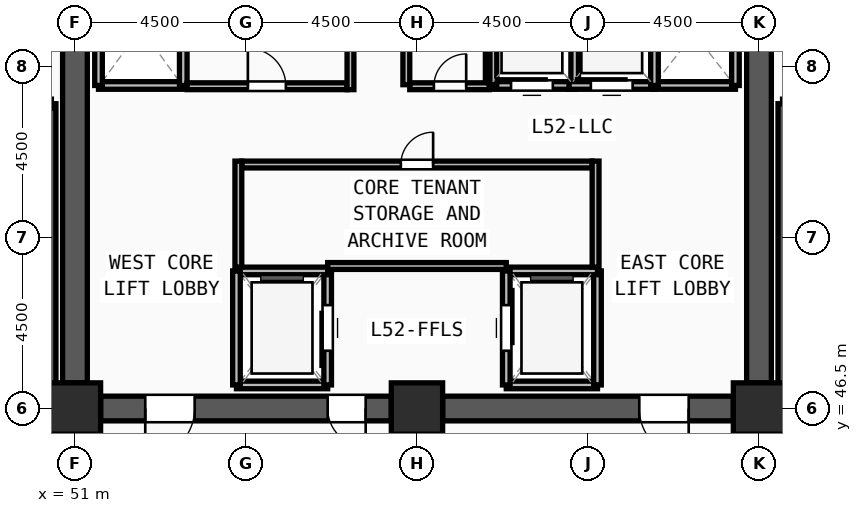
"""IFC4 building model, lengths in metres.
Left out: names, types, materials, properties, quantities, classifications, styles, units other than length and angle.
Written with IfcOpenShell. Run it as: python <this file> out.ifc"""

import sys

from ifc_helpers import new_model, si_unit, direction, frame, frame_2d, origin, origin_2d, place, context, subcontext, project, spatial, rectangle, extrude, source, transform, mapped, element, fill, save


model = new_model("IFC4")
c1 = context("Model", 3, precision=1e-05, world=origin(), true_north=direction((0.0, 1.0)))
c2 = subcontext(c1, "Body", "Model", "MODEL_VIEW")
j1 = project(units=[si_unit("LENGTHUNIT", "METRE"), si_unit("PLANEANGLEUNIT", "RADIAN")], contexts=[c1])
p1 = place(None, origin())
s1 = spatial("IfcSite", under=j1, at=p1, CompositionType="ELEMENT")
p2 = place(p1, origin())
s2 = spatial("IfcBuilding", under=s1, at=p2, CompositionType="ELEMENT")
p3 = place(p2, frame((0.0, 0.0, 201.75)))
s3 = spatial("IfcBuildingStorey", under=s2, at=p3, CompositionType="ELEMENT", Elevation=201.75)
m1 = source(origin(), c2, "Body", "SweptSolid", [
    extrude(rectangle(XDim=1.35, YDim=1.35, at=origin_2d()), origin(), (0.0, 0.0, 1.0), 3.75),
])
for number, where, z_axis, x_axis in (
    (1, (51.0, 46.5, 0.0), (0.0, 0.0, 1.0), (1.0, 0.0, 0.0)),
    (2, (60.0, 46.5, 0.0), (0.0, 0.0, 1.0), (1.0, 0.0, 0.0)),
    (3, (69.0, 46.5, 0.0), (0.0, 0.0, 1.0), (1.0, 0.0, 0.0)),
):
    element("IfcColumn", number, at=place(p3, frame(where, z_axis=z_axis, x_axis=x_axis)), inside=s3, PredefinedType="COLUMN", context=c2, shape_type="MappedRepresentation", body=[
        mapped(m1, transform((0.0, 0.0, 0.0), x_axis=(1.0, 0.0, 0.0), y_axis=(0.0, 1.0, 0.0), z_axis=(0.0, 0.0, 1.0), scale=1.0)),
    ])
p4 = place(p3, frame((69.0, 60.825, 0.0), z_axis=(0.0, 0.0, 1.0), x_axis=(0.0, -1.0, 0.0)))
e4 = element("IfcWall", 4, at=p4, inside=s3, PredefinedType="SHEAR", context=c2, shape_type="SweptSolid", body=[
    extrude(rectangle(XDim=13.65, YDim=0.65, at=frame_2d((6.825, 0.0))), origin(), (0.0, 0.0, 1.0), 3.57),
])
m2 = source(origin(), c2, "Body", "SweptSolid", [
    extrude(rectangle(XDim=1.2, YDim=2.2, at=frame_2d((0.6, 1.1))), frame((0.0, 0.335, 0.0), z_axis=(0.0, -1.0, 0.0), x_axis=(1.0, 0.0, 0.0)), (0.0, 0.0, 1.0), 0.67),
])
p5 = place(p4, frame((1.275, 0.0, 0.0)))
e5 = element("IfcOpeningElement", 5, at=p5, cuts=e4, PredefinedType="OPENING", context=c2, shape_type="MappedRepresentation", body=[
    mapped(m2, transform((0.0, 0.0, 0.0), x_axis=(1.0, 0.0, 0.0), y_axis=(0.0, 1.0, 0.0), z_axis=(0.0, 0.0, 1.0), scale=1.0)),
])
p6 = place(p3, frame((68.325, 46.5, 0.0), z_axis=(0.0, 0.0, 1.0), x_axis=(-1.0, 0.0, 0.0)))
e6 = element("IfcWall", 6, at=p6, inside=s3, PredefinedType="SHEAR", context=c2, shape_type="SweptSolid", body=[
    extrude(rectangle(XDim=7.65, YDim=0.65, at=frame_2d((3.825, 0.0))), origin(), (0.0, 0.0, 1.0), 3.57),
])
m3 = source(origin(), c2, "Body", "SweptSolid", [
    extrude(rectangle(XDim=1.3, YDim=2.2, at=frame_2d((0.65, 1.1))), frame((0.0, 0.335, 0.0), z_axis=(0.0, -1.0, 0.0), x_axis=(1.0, 0.0, 0.0)), (0.0, 0.0, 1.0), 0.67),
])
p7 = place(p6, frame((1.175, 0.0, 0.0)))
e7 = element("IfcOpeningElement", 7, at=p7, cuts=e6, PredefinedType="OPENING", context=c2, shape_type="MappedRepresentation", body=[
    mapped(m3, transform((0.0, 0.0, 0.0), x_axis=(1.0, 0.0, 0.0), y_axis=(0.0, 1.0, 0.0), z_axis=(0.0, 0.0, 1.0), scale=1.0)),
])
p8 = place(p3, frame((59.325, 46.5, 0.0), z_axis=(0.0, 0.0, 1.0), x_axis=(-1.0, 0.0, 0.0)))
e8 = element("IfcWall", 8, at=p8, inside=s3, PredefinedType="SHEAR", context=c2, shape_type="SweptSolid", body=[
    extrude(rectangle(XDim=7.65, YDim=0.65, at=frame_2d((3.825, 0.0))), origin(), (0.0, 0.0, 1.0), 3.57),
])
p9 = place(p8, frame((5.175, 0.0, 0.0)))
e9 = element("IfcOpeningElement", 9, at=p9, cuts=e8, PredefinedType="OPENING", context=c2, shape_type="MappedRepresentation", body=[
    mapped(m3, transform((0.0, 0.0, 0.0), x_axis=(1.0, 0.0, 0.0), y_axis=(0.0, 1.0, 0.0), z_axis=(0.0, 0.0, 1.0), scale=1.0)),
])
m4 = source(origin(), c2, "Body", "SweptSolid", [
    extrude(rectangle(XDim=1.0, YDim=2.2, at=frame_2d((0.5, 1.1))), frame((0.0, 0.335, 0.0), z_axis=(0.0, -1.0, 0.0), x_axis=(1.0, 0.0, 0.0)), (0.0, 0.0, 1.0), 0.67),
])
p10 = place(p8, frame((0.675, 0.0, 0.0)))
e10 = element("IfcOpeningElement", 10, at=p10, cuts=e8, PredefinedType="OPENING", context=c2, shape_type="MappedRepresentation", body=[
    mapped(m4, transform((0.0, 0.0, 0.0), x_axis=(1.0, 0.0, 0.0), y_axis=(0.0, 1.0, 0.0), z_axis=(0.0, 0.0, 1.0), scale=1.0)),
])
p11 = place(p3, frame((51.0, 47.175, 0.0), z_axis=(0.0, 0.0, 1.0), x_axis=(0.0, 1.0, 0.0)))
e11 = element("IfcWall", 11, at=p11, inside=s3, PredefinedType="SHEAR", context=c2, shape_type="SweptSolid", body=[
    extrude(rectangle(XDim=13.65, YDim=0.65, at=frame_2d((6.825, 0.0))), origin(), (0.0, 0.0, 1.0), 3.57),
])
for number, where, z_axis, x_axis in (
    (12, (50.38, 46.7, 0.0), (0.0, 0.0, 1.0), (0.0, 1.0, 0.0)),
    (13, (69.62, 54.52, 0.0), (0.0, 0.0, 1.0), (0.0, -1.0, 0.0)),
):
    element("IfcWall", number, at=place(p3, frame(where, z_axis=z_axis, x_axis=x_axis)), inside=s3, PredefinedType="SOLIDWALL", context=c2, shape_type="SweptSolid", body=[
        extrude(rectangle(XDim=7.82, YDim=0.24, at=frame_2d((3.91, 0.0))), origin(), (0.0, 0.0, 1.0), 3.57),
    ])
p12 = place(p3, frame((55.25, 47.12, 0.0), z_axis=(0.0, 0.0, 1.0), x_axis=(1.0, 0.0, 0.0)))
e14 = element("IfcWall", 14, at=p12, inside=s3, PredefinedType="SOLIDWALL", context=c2, shape_type="SweptSolid", body=[
    extrude(rectangle(XDim=2.4, YDim=0.2, at=frame_2d((1.2, 0.0))), origin(), (0.0, 0.0, 1.0), 3.57),
])
p13 = place(p3, frame((57.65, 47.12, 0.0), z_axis=(0.0, 0.0, 1.0), x_axis=(0.0, 1.0, 0.0)))
e15 = element("IfcWall", 15, at=p13, inside=s3, PredefinedType="SOLIDWALL", context=c2, shape_type="SweptSolid", body=[
    extrude(rectangle(XDim=3.0, YDim=0.2, at=frame_2d((1.5, 0.0))), origin(), (0.0, 0.0, 1.0), 3.57),
])
m5 = source(origin(), c2, "Body", "SweptSolid", [
    extrude(rectangle(XDim=1.2, YDim=2.3, at=frame_2d((0.6, 1.15))), frame((0.0, 0.11, 0.0), z_axis=(0.0, -1.0, 0.0), x_axis=(1.0, 0.0, 0.0)), (0.0, 0.0, 1.0), 0.22),
])
p14 = place(p13, frame((0.9, 0.0, 0.0)))
e16 = element("IfcOpeningElement", 16, at=p14, cuts=e15, PredefinedType="OPENING", context=c2, shape_type="MappedRepresentation", body=[
    mapped(m5, transform((0.0, 0.0, 0.0), x_axis=(1.0, 0.0, 0.0), y_axis=(0.0, 1.0, 0.0), z_axis=(0.0, 0.0, 1.0), scale=1.0)),
])
p15 = place(p3, frame((57.65, 50.12, 0.0), z_axis=(0.0, 0.0, 1.0), x_axis=(-1.0, 0.0, 0.0)))
e17 = element("IfcWall", 17, at=p15, inside=s3, PredefinedType="SOLIDWALL", context=c2, shape_type="SweptSolid", body=[
    extrude(rectangle(XDim=2.4, YDim=0.2, at=frame_2d((1.2, 0.0))), origin(), (0.0, 0.0, 1.0), 3.57),
])
p16 = place(p3, frame((55.25, 50.12, 0.0), z_axis=(0.0, 0.0, 1.0), x_axis=(0.0, -1.0, 0.0)))
e18 = element("IfcWall", 18, at=p16, inside=s3, PredefinedType="SOLIDWALL", context=c2, shape_type="SweptSolid", body=[
    extrude(rectangle(XDim=3.0, YDim=0.2, at=frame_2d((1.5, 0.0))), origin(), (0.0, 0.0, 1.0), 3.57),
])
p17 = place(p3, frame((62.35, 47.12, 0.0), z_axis=(0.0, 0.0, 1.0), x_axis=(1.0, 0.0, 0.0)))
e19 = element("IfcWall", 19, at=p17, inside=s3, PredefinedType="SOLIDWALL", context=c2, shape_type="SweptSolid", body=[
    extrude(rectangle(XDim=2.4, YDim=0.2, at=frame_2d((1.2, 0.0))), origin(), (0.0, 0.0, 1.0), 3.57),
])
p18 = place(p3, frame((64.75, 47.12, 0.0), z_axis=(0.0, 0.0, 1.0), x_axis=(0.0, 1.0, 0.0)))
e20 = element("IfcWall", 20, at=p18, inside=s3, PredefinedType="SOLIDWALL", context=c2, shape_type="SweptSolid", body=[
    extrude(rectangle(XDim=3.0, YDim=0.2, at=frame_2d((1.5, 0.0))), origin(), (0.0, 0.0, 1.0), 3.57),
])
p19 = place(p3, frame((64.75, 50.12, 0.0), z_axis=(0.0, 0.0, 1.0), x_axis=(-1.0, 0.0, 0.0)))
e21 = element("IfcWall", 21, at=p19, inside=s3, PredefinedType="SOLIDWALL", context=c2, shape_type="SweptSolid", body=[
    extrude(rectangle(XDim=2.4, YDim=0.2, at=frame_2d((1.2, 0.0))), origin(), (0.0, 0.0, 1.0), 3.57),
])
p20 = place(p3, frame((62.35, 50.12, 0.0), z_axis=(0.0, 0.0, 1.0), x_axis=(0.0, -1.0, 0.0)))
e22 = element("IfcWall", 22, at=p20, inside=s3, PredefinedType="SOLIDWALL", context=c2, shape_type="SweptSolid", body=[
    extrude(rectangle(XDim=3.0, YDim=0.2, at=frame_2d((1.5, 0.0))), origin(), (0.0, 0.0, 1.0), 3.57),
])
p21 = place(p20, frame((0.9, 0.0, 0.0)))
e23 = element("IfcOpeningElement", 23, at=p21, cuts=e22, PredefinedType="OPENING", context=c2, shape_type="MappedRepresentation", body=[
    mapped(m5, transform((0.0, 0.0, 0.0), x_axis=(1.0, 0.0, 0.0), y_axis=(0.0, 1.0, 0.0), z_axis=(0.0, 0.0, 1.0), scale=1.0)),
])
p22 = place(p3, frame((51.62, 55.0, 0.0), z_axis=(0.0, 0.0, 1.0), x_axis=(1.0, 0.0, 0.0)))
e24 = element("IfcWall", 24, at=p22, inside=s3, PredefinedType="SOLIDWALL", context=c2, shape_type="SweptSolid", body=[
    extrude(rectangle(XDim=2.23, YDim=0.2, at=frame_2d((1.115, 0.0))), origin(), (0.0, 0.0, 1.0), 3.57),
])
for number, where, z_axis, x_axis in (
    (25, (53.85, 55.0, 0.0), (0.0, 0.0, 1.0), (0.0, 1.0, 0.0)),
    (26, (51.62, 58.0, 0.0), (0.0, 0.0, 1.0), (0.0, -1.0, 0.0)),
):
    element("IfcWall", number, at=place(p3, frame(where, z_axis=z_axis, x_axis=x_axis)), inside=s3, PredefinedType="SOLIDWALL", context=c2, shape_type="SweptSolid", body=[
        extrude(rectangle(XDim=3.0, YDim=0.2, at=frame_2d((1.5, 0.0))), origin(), (0.0, 0.0, 1.0), 3.57),
    ])
p23 = place(p3, frame((66.2, 55.0, 0.0), z_axis=(0.0, 0.0, 1.0), x_axis=(1.0, 0.0, 0.0)))
e27 = element("IfcWall", 27, at=p23, inside=s3, PredefinedType="SOLIDWALL", context=c2, shape_type="SweptSolid", body=[
    extrude(rectangle(XDim=2.18, YDim=0.2, at=frame_2d((1.09, 0.0))), origin(), (0.0, 0.0, 1.0), 3.57),
])
p24 = place(p3, frame((68.38, 55.0, 0.0), z_axis=(0.0, 0.0, 1.0), x_axis=(0.0, 1.0, 0.0)))
e28 = element("IfcWall", 28, at=p24, inside=s3, PredefinedType="SOLIDWALL", context=c2, shape_type="SweptSolid", body=[
    extrude(rectangle(XDim=2.75, YDim=0.2, at=frame_2d((1.375, 0.0))), origin(), (0.0, 0.0, 1.0), 3.57),
])
p25 = place(p3, frame((61.9, 55.0, 0.0), z_axis=(0.0, 0.0, 1.0), x_axis=(1.0, 0.0, 0.0)))
e29 = element("IfcWall", 29, at=p25, inside=s3, PredefinedType="SOLIDWALL", context=c2, shape_type="SweptSolid", body=[
    extrude(rectangle(XDim=2.25, YDim=0.2, at=frame_2d((1.125, 0.0))), origin(), (0.0, 0.0, 1.0), 3.57),
])
m6 = source(origin(), c2, "Body", "SweptSolid", [
    extrude(rectangle(XDim=1.1, YDim=2.2, at=frame_2d((0.55, 1.1))), frame((0.0, 0.11, 0.0), z_axis=(0.0, -1.0, 0.0), x_axis=(1.0, 0.0, 0.0)), (0.0, 0.0, 1.0), 0.22),
])
p26 = place(p25, frame((0.575, 0.0, 0.0)))
e30 = element("IfcOpeningElement", 30, at=p26, cuts=e29, PredefinedType="OPENING", context=c2, shape_type="MappedRepresentation", body=[
    mapped(m6, transform((0.0, 0.0, 0.0), x_axis=(1.0, 0.0, 0.0), y_axis=(0.0, 1.0, 0.0), z_axis=(0.0, 0.0, 1.0), scale=1.0)),
])
for number, where, z_axis, x_axis in (
    (31, (64.15, 55.0, 0.0), (0.0, 0.0, 1.0), (0.0, 1.0, 0.0)),
    (32, (61.9, 57.6, 0.0), (0.0, 0.0, 1.0), (0.0, -1.0, 0.0)),
):
    element("IfcWall", number, at=place(p3, frame(where, z_axis=z_axis, x_axis=x_axis)), inside=s3, PredefinedType="SOLIDWALL", context=c2, shape_type="SweptSolid", body=[
        extrude(rectangle(XDim=2.6, YDim=0.2, at=frame_2d((1.3, 0.0))), origin(), (0.0, 0.0, 1.0), 3.57),
    ])
p27 = place(p3, frame((64.0, 55.0, 0.0), z_axis=(0.0, 0.0, 1.0), x_axis=(1.0, 0.0, 0.0)))
e33 = element("IfcWall", 33, at=p27, inside=s3, PredefinedType="SOLIDWALL", context=c2, shape_type="SweptSolid", body=[
    extrude(rectangle(XDim=2.25, YDim=0.2, at=frame_2d((1.125, 0.0))), origin(), (0.0, 0.0, 1.0), 3.57),
])
p28 = place(p27, frame((0.575, 0.0, 0.0)))
e34 = element("IfcOpeningElement", 34, at=p28, cuts=e33, PredefinedType="OPENING", context=c2, shape_type="MappedRepresentation", body=[
    mapped(m6, transform((0.0, 0.0, 0.0), x_axis=(1.0, 0.0, 0.0), y_axis=(0.0, 1.0, 0.0), z_axis=(0.0, 0.0, 1.0), scale=1.0)),
])
p29 = place(p3, frame((66.25, 55.0, 0.0), z_axis=(0.0, 0.0, 1.0), x_axis=(0.0, 1.0, 0.0)))
e35 = element("IfcWall", 35, at=p29, inside=s3, PredefinedType="SOLIDWALL", context=c2, shape_type="SweptSolid", body=[
    extrude(rectangle(XDim=2.6, YDim=0.2, at=frame_2d((1.3, 0.0))), origin(), (0.0, 0.0, 1.0), 3.57),
])
p30 = place(p3, frame((55.39, 52.92, 0.0), z_axis=(0.0, 0.0, 1.0), x_axis=(1.0, 0.0, 0.0)))
e36 = element("IfcWall", 36, at=p30, inside=s3, PredefinedType="PARTITIONING", context=c2, shape_type="SweptSolid", body=[
    extrude(rectangle(XDim=9.22, YDim=0.18, at=frame_2d((4.61, 0.0))), origin(), (0.0, 0.0, 1.0), 3.57),
])
m7 = source(origin(), c2, "Body", "SweptSolid", [
    extrude(rectangle(XDim=0.85, YDim=2.1, at=frame_2d((0.425, 1.05))), frame((0.0, 0.1, 0.0), z_axis=(0.0, -1.0, 0.0), x_axis=(1.0, 0.0, 0.0)), (0.0, 0.0, 1.0), 0.2),
])
p31 = place(p30, frame((4.185, 0.0, 0.0)))
e37 = element("IfcOpeningElement", 37, at=p31, cuts=e36, PredefinedType="OPENING", context=c2, shape_type="MappedRepresentation", body=[
    mapped(m7, transform((0.0, 0.0, 0.0), x_axis=(1.0, 0.0, 0.0), y_axis=(0.0, 1.0, 0.0), z_axis=(0.0, 0.0, 1.0), scale=1.0)),
])
p32 = place(p3, frame((53.95, 54.98, 0.0), z_axis=(0.0, 0.0, 1.0), x_axis=(1.0, 0.0, 0.0)))
e38 = element("IfcWall", 38, at=p32, inside=s3, PredefinedType="PARTITIONING", context=c2, shape_type="SweptSolid", body=[
    extrude(rectangle(XDim=4.21, YDim=0.18, at=frame_2d((2.105, 0.0))), origin(), (0.0, 0.0, 1.0), 3.57),
])
m8 = source(origin(), c2, "Body", "SweptSolid", [
    extrude(rectangle(XDim=1.0, YDim=2.2, at=frame_2d((0.5, 1.1))), frame((0.0, 0.1, 0.0), z_axis=(0.0, -1.0, 0.0), x_axis=(1.0, 0.0, 0.0)), (0.0, 0.0, 1.0), 0.2),
])
p33 = place(p32, frame((1.6, 0.0, 0.0)))
e39 = element("IfcOpeningElement", 39, at=p33, cuts=e38, PredefinedType="OPENING", context=c2, shape_type="MappedRepresentation", body=[
    mapped(m8, transform((0.0, 0.0, 0.0), x_axis=(1.0, 0.0, 0.0), y_axis=(0.0, 1.0, 0.0), z_axis=(0.0, 0.0, 1.0), scale=1.0)),
])
p34 = place(p3, frame((59.81, 54.98, 0.0), z_axis=(0.0, 0.0, 1.0), x_axis=(1.0, 0.0, 0.0)))
e40 = element("IfcWall", 40, at=p34, inside=s3, PredefinedType="PARTITIONING", context=c2, shape_type="SweptSolid", body=[
    extrude(rectangle(XDim=2.09, YDim=0.18, at=frame_2d((1.045, 0.0))), origin(), (0.0, 0.0, 1.0), 3.57),
])
p35 = place(p34, frame((0.635, 0.0, 0.0)))
e41 = element("IfcOpeningElement", 41, at=p35, cuts=e40, PredefinedType="OPENING", context=c2, shape_type="MappedRepresentation", body=[
    mapped(m7, transform((0.0, 0.0, 0.0), x_axis=(1.0, 0.0, 0.0), y_axis=(0.0, 1.0, 0.0), z_axis=(0.0, 0.0, 1.0), scale=1.0)),
])
for number, where, z_axis, x_axis in (
    (42, (59.72, 55.02, 0.0), (0.0, 0.0, 1.0), (0.0, 1.0, 0.0)),
    (43, (62.01, 55.02, 0.0), (0.0, 0.0, 1.0), (0.0, 1.0, 0.0)),
):
    element("IfcWall", number, at=place(p3, frame(where, z_axis=z_axis, x_axis=x_axis)), inside=s3, PredefinedType="PARTITIONING", context=c2, shape_type="SweptSolid", body=[
        extrude(rectangle(XDim=2.88, YDim=0.18, at=frame_2d((1.44, 0.0))), origin(), (0.0, 0.0, 1.0), 3.57),
    ])
for number, where, z_axis, x_axis in (
    (44, (55.3, 50.22, 0.0), (0.0, 0.0, 1.0), (0.0, 1.0, 0.0)),
    (45, (64.7, 50.22, 0.0), (0.0, 0.0, 1.0), (0.0, 1.0, 0.0)),
):
    element("IfcWall", number, at=place(p3, frame(where, z_axis=z_axis, x_axis=x_axis)), inside=s3, PredefinedType="PARTITIONING", context=c2, shape_type="SweptSolid", body=[
        extrude(rectangle(XDim=2.79, YDim=0.18, at=frame_2d((1.395, 0.0))), origin(), (0.0, 0.0, 1.0), 3.57),
    ])
p36 = place(p3, frame((57.65, 50.25, 0.0), z_axis=(0.0, 0.0, 1.0), x_axis=(1.0, 0.0, 0.0)))
e46 = element("IfcWall", 46, at=p36, inside=s3, PredefinedType="PARTITIONING", context=c2, shape_type="SweptSolid", body=[
    extrude(rectangle(XDim=4.7, YDim=0.18, at=frame_2d((2.35, 0.0))), origin(), (0.0, 0.0, 1.0), 3.57),
])
p37 = place(p3, frame((58.25, 54.89, 0.0), z_axis=(0.0, 0.0, 1.0), x_axis=(0.0, 1.0, 0.0)))
e47 = element("IfcWall", 47, at=p37, inside=s3, PredefinedType="PARTITIONING", context=c2, shape_type="SweptSolid", body=[
    extrude(rectangle(XDim=3.02, YDim=0.18, at=frame_2d((1.51, 0.0))), origin(), (0.0, 0.0, 1.0), 3.57),
])
m9 = source(origin(), c2, "Body", "SweptSolid", [
    extrude(rectangle(XDim=1.3, YDim=2.2, at=frame_2d((0.65, 1.1))), frame((0.0, 0.025, 0.0), z_axis=(0.0, -1.0, 0.0), x_axis=(1.0, 0.0, 0.0)), (0.0, 0.0, 1.0), 0.05),
])
p38 = place(p9, origin())
e48 = element("IfcDoor", 48, at=p38, inside=s3, OperationType="SINGLE_SWING_RIGHT", PredefinedType="DOOR", context=c2, shape_type="MappedRepresentation", body=[
    mapped(m9, transform((0.0, 0.0, 0.0), x_axis=(1.0, 0.0, 0.0), y_axis=(0.0, 1.0, 0.0), z_axis=(0.0, 0.0, 1.0), scale=1.0)),
])
fill(e9, e48)
m10 = source(origin(), c2, "Body", "SweptSolid", [
    extrude(rectangle(XDim=1.0, YDim=2.2, at=frame_2d((0.5, 1.1))), frame((0.0, 0.025, 0.0), z_axis=(0.0, -1.0, 0.0), x_axis=(1.0, 0.0, 0.0)), (0.0, 0.0, 1.0), 0.05),
])
p39 = place(p10, origin())
e49 = element("IfcDoor", 49, at=p39, inside=s3, OperationType="SINGLE_SWING_LEFT", PredefinedType="DOOR", context=c2, shape_type="MappedRepresentation", body=[
    mapped(m10, transform((0.0, 0.0, 0.0), x_axis=(1.0, 0.0, 0.0), y_axis=(0.0, 1.0, 0.0), z_axis=(0.0, 0.0, 1.0), scale=1.0)),
])
fill(e10, e49)
p40 = place(p7, origin())
e50 = element("IfcDoor", 50, at=p40, inside=s3, OperationType="SINGLE_SWING_LEFT", PredefinedType="DOOR", context=c2, shape_type="MappedRepresentation", body=[
    mapped(m9, transform((0.0, 0.0, 0.0), x_axis=(1.0, 0.0, 0.0), y_axis=(0.0, 1.0, 0.0), z_axis=(0.0, 0.0, 1.0), scale=1.0)),
])
fill(e7, e50)
m11 = source(origin(), c2, "Body", "SweptSolid", [
    extrude(rectangle(XDim=1.2, YDim=2.3, at=frame_2d((0.6, 1.15))), frame((0.0, 0.025, 0.0), z_axis=(0.0, -1.0, 0.0), x_axis=(1.0, 0.0, 0.0)), (0.0, 0.0, 1.0), 0.05),
])
p41 = place(p14, origin())
e51 = element("IfcDoor", 51, at=p41, inside=s3, OperationType="SLIDING_TO_LEFT", PredefinedType="DOOR", context=c2, shape_type="MappedRepresentation", body=[
    mapped(m11, transform((0.0, 0.0, 0.0), x_axis=(1.0, 0.0, 0.0), y_axis=(0.0, 1.0, 0.0), z_axis=(0.0, 0.0, 1.0), scale=1.0)),
])
fill(e16, e51)
p42 = place(p21, origin())
e52 = element("IfcDoor", 52, at=p42, inside=s3, OperationType="SLIDING_TO_LEFT", PredefinedType="DOOR", context=c2, shape_type="MappedRepresentation", body=[
    mapped(m11, transform((0.0, 0.0, 0.0), x_axis=(1.0, 0.0, 0.0), y_axis=(0.0, 1.0, 0.0), z_axis=(0.0, 0.0, 1.0), scale=1.0)),
])
fill(e23, e52)
m12 = source(origin(), c2, "Body", "SweptSolid", [
    extrude(rectangle(XDim=1.1, YDim=2.2, at=frame_2d((0.55, 1.1))), frame((0.0, 0.025, 0.0), z_axis=(0.0, -1.0, 0.0), x_axis=(1.0, 0.0, 0.0)), (0.0, 0.0, 1.0), 0.05),
])
p43 = place(p26, origin())
e53 = element("IfcDoor", 53, at=p43, inside=s3, OperationType="SLIDING_TO_LEFT", PredefinedType="DOOR", context=c2, shape_type="MappedRepresentation", body=[
    mapped(m12, transform((0.0, 0.0, 0.0), x_axis=(1.0, 0.0, 0.0), y_axis=(0.0, 1.0, 0.0), z_axis=(0.0, 0.0, 1.0), scale=1.0)),
])
fill(e30, e53)
p44 = place(p28, origin())
e54 = element("IfcDoor", 54, at=p44, inside=s3, OperationType="SLIDING_TO_LEFT", PredefinedType="DOOR", context=c2, shape_type="MappedRepresentation", body=[
    mapped(m12, transform((0.0, 0.0, 0.0), x_axis=(1.0, 0.0, 0.0), y_axis=(0.0, 1.0, 0.0), z_axis=(0.0, 0.0, 1.0), scale=1.0)),
])
fill(e34, e54)
m13 = source(origin(), c2, "Body", "SweptSolid", [
    extrude(rectangle(XDim=0.85, YDim=2.1, at=frame_2d((0.425, 1.05))), frame((0.0, 0.025, 0.0), z_axis=(0.0, -1.0, 0.0), x_axis=(1.0, 0.0, 0.0)), (0.0, 0.0, 1.0), 0.05),
])
p45 = place(p31, origin())
e55 = element("IfcDoor", 55, at=p45, inside=s3, OperationType="SINGLE_SWING_RIGHT", PredefinedType="DOOR", context=c2, shape_type="MappedRepresentation", body=[
    mapped(m13, transform((0.0, 0.0, 0.0), x_axis=(1.0, 0.0, 0.0), y_axis=(0.0, 1.0, 0.0), z_axis=(0.0, 0.0, 1.0), scale=1.0)),
])
fill(e37, e55)
p46 = place(p33, origin())
e56 = element("IfcDoor", 56, at=p46, inside=s3, OperationType="SINGLE_SWING_LEFT", PredefinedType="DOOR", context=c2, shape_type="MappedRepresentation", body=[
    mapped(m10, transform((0.0, 0.0, 0.0), x_axis=(1.0, 0.0, 0.0), y_axis=(0.0, 1.0, 0.0), z_axis=(0.0, 0.0, 1.0), scale=1.0)),
])
fill(e39, e56)
p47 = place(p35, origin())
e57 = element("IfcDoor", 57, at=p47, inside=s3, OperationType="SINGLE_SWING_RIGHT", PredefinedType="DOOR", context=c2, shape_type="MappedRepresentation", body=[
    mapped(m13, transform((0.0, 0.0, 0.0), x_axis=(1.0, 0.0, 0.0), y_axis=(0.0, 1.0, 0.0), z_axis=(0.0, 0.0, 1.0), scale=1.0)),
])
fill(e41, e57)
save(model, sys.argv[1])
